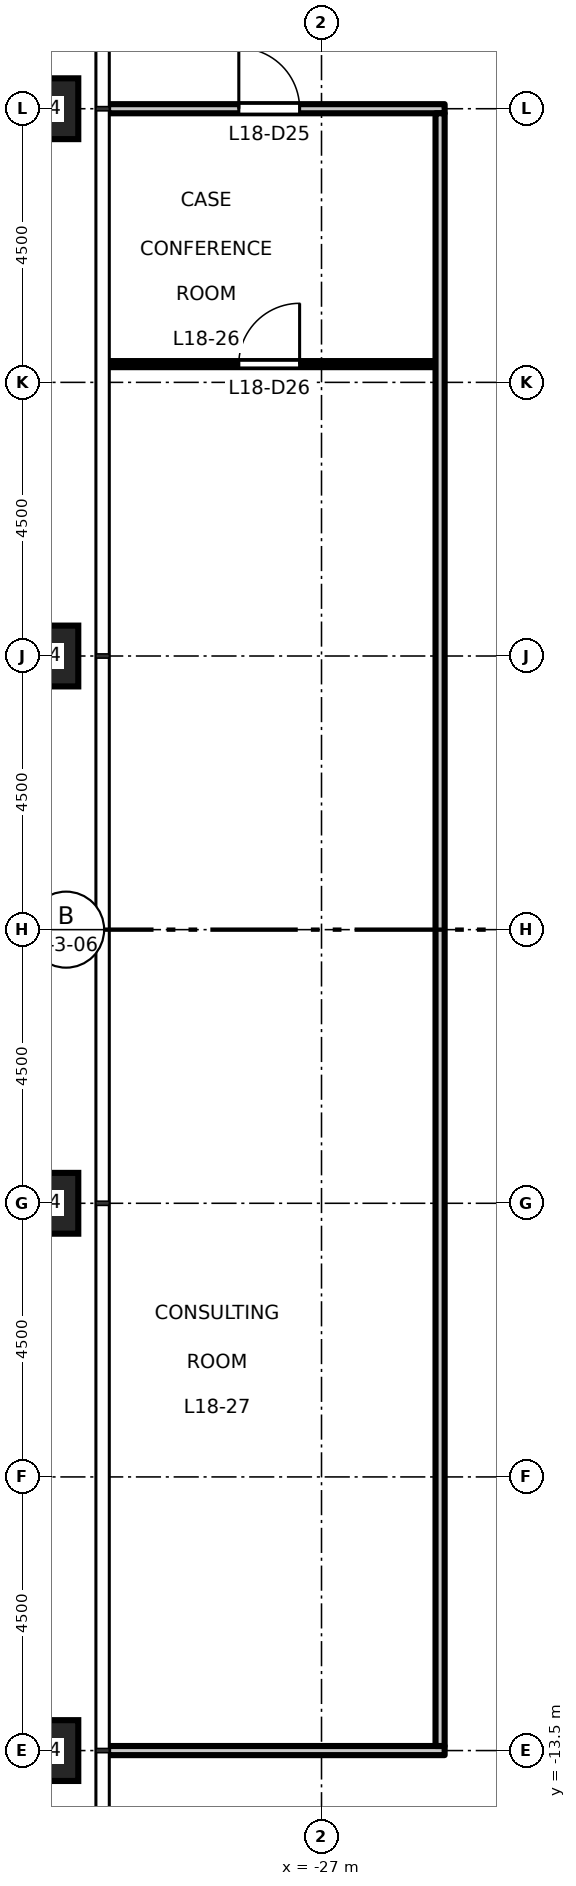
"""IFC4 building model, lengths in metres.
Left out: names, types, materials, properties, quantities, classifications, styles, units other than length and angle.
Written with IfcOpenShell. Run it as: python <this file> out.ifc"""

import sys

from ifc_helpers import new_model, si_unit, direction, frame, frame_2d, origin, origin_2d, place, context, subcontext, project, spatial, rectangle, hollow_rectangle, extrude, element, fill, save


model = new_model("IFC4")
c1 = context("Model", 3, precision=1e-05, world=origin(), true_north=direction((0.0, 1.0)))
c2 = subcontext(c1, "Body", "Model", "MODEL_VIEW")
j1 = project(units=[si_unit("LENGTHUNIT", "METRE"), si_unit("PLANEANGLEUNIT", "RADIAN")], contexts=[c1])
p1 = place(None, origin())
s1 = spatial("IfcSite", under=j1, at=p1, CompositionType="ELEMENT")
p2 = place(p1, origin())
s2 = spatial("IfcBuilding", under=s1, at=p2, CompositionType="ELEMENT")
p3 = place(p2, frame((0.0, 0.0, 85.2)))
s3 = spatial("IfcBuildingStorey", under=s2, at=p3, CompositionType="ELEMENT", Elevation=85.2)
for number, where, z_axis, x_axis in (
    (1, (-31.5, 13.5, 0.0), (0.0, 0.0, 1.0), (1.0, 0.0, 0.0)),
    (2, (-31.5, 4.5, 0.0), (0.0, 0.0, 1.0), (1.0, 0.0, 0.0)),
    (3, (-31.5, -4.5, 0.0), (0.0, 0.0, 1.0), (1.0, 0.0, 0.0)),
    (4, (-31.5, -13.5, 0.0), (0.0, 0.0, 1.0), (1.0, 0.0, 0.0)),
):
    element("IfcColumn", number, at=place(p3, frame(where, z_axis=z_axis, x_axis=x_axis)), inside=s3, PredefinedType="COLUMN", context=c2, shape_type="SweptSolid", body=[
        extrude(hollow_rectangle(XDim=1.0, YDim=1.0, WallThickness=0.06, at=origin_2d()), origin(), (0.0, 0.0, 1.0), 4.5),
    ])
p4 = place(p3, frame((-30.51, -13.5, 0.0), z_axis=(0.0, 0.0, 1.0), x_axis=(1.0, 0.0, 0.0)))
e5 = element("IfcWall", 5, at=p4, inside=s3, PredefinedType="PARTITIONING", context=c2, shape_type="SweptSolid", body=[
    extrude(rectangle(XDim=5.535, YDim=0.15, at=frame_2d((2.768, 0.0))), origin(), (0.0, 0.0, 1.0), 3.35),
])
p5 = place(p3, frame((-30.51, 9.3, 0.0), z_axis=(0.0, 0.0, 1.0), x_axis=(1.0, 0.0, 0.0)))
e6 = element("IfcWall", 6, at=p5, inside=s3, PredefinedType="PARTITIONING", context=c2, shape_type="SweptSolid", body=[
    extrude(rectangle(XDim=5.385, YDim=0.1, at=frame_2d((2.692, 0.0))), origin(), (0.0, 0.0, 1.0), 4.35),
])
p6 = place(p5, frame((2.15, 0.0, 0.0)))
e7 = element("IfcOpeningElement", 7, at=p6, cuts=e6, PredefinedType="OPENING", context=c2, shape_type="SweptSolid", body=[
    extrude(rectangle(XDim=1.0, YDim=2.1, at=frame_2d((0.5, 1.05))), frame((0.0, 0.06, 0.0), z_axis=(0.0, -1.0, 0.0), x_axis=(1.0, 0.0, 0.0)), (0.0, 0.0, 1.0), 0.12),
])
p7 = place(p3, frame((-30.51, 13.5, 0.0), z_axis=(0.0, 0.0, 1.0), x_axis=(1.0, 0.0, 0.0)))
e8 = element("IfcWall", 8, at=p7, inside=s3, PredefinedType="PARTITIONING", context=c2, shape_type="SweptSolid", body=[
    extrude(rectangle(XDim=5.535, YDim=0.15, at=frame_2d((2.768, 0.0))), origin(), (0.0, 0.0, 1.0), 3.35),
])
p8 = place(p7, frame((2.15, 0.0, 0.0)))
e9 = element("IfcOpeningElement", 9, at=p8, cuts=e8, PredefinedType="OPENING", context=c2, shape_type="SweptSolid", body=[
    extrude(rectangle(XDim=1.0, YDim=2.1, at=frame_2d((0.5, 1.05))), frame((0.0, 0.085, 0.0), z_axis=(0.0, -1.0, 0.0), x_axis=(1.0, 0.0, 0.0)), (0.0, 0.0, 1.0), 0.17),
])
p9 = place(p3, frame((-25.05, -13.425, 0.0), z_axis=(0.0, 0.0, 1.0), x_axis=(0.0, 1.0, 0.0)))
e10 = element("IfcWall", 10, at=p9, inside=s3, PredefinedType="PARTITIONING", context=c2, shape_type="SweptSolid", body=[
    extrude(rectangle(XDim=26.85, YDim=0.15, at=frame_2d((13.425, 0.0))), origin(), (0.0, 0.0, 1.0), 4.35),
])
p10 = place(p8, origin())
e11 = element("IfcDoor", 11, at=p10, inside=s3, OperationType="SINGLE_SWING_LEFT", PredefinedType="DOOR", context=c2, shape_type="SweptSolid", body=[
    extrude(rectangle(XDim=1.0, YDim=2.1, at=frame_2d((0.5, 1.05))), frame((0.0, 0.025, 0.0), z_axis=(0.0, -1.0, 0.0), x_axis=(1.0, 0.0, 0.0)), (0.0, 0.0, 1.0), 0.05),
])
fill(e9, e11)
p11 = place(p6, origin())
e12 = element("IfcDoor", 12, at=p11, inside=s3, OperationType="SINGLE_SWING_RIGHT", PredefinedType="DOOR", context=c2, shape_type="SweptSolid", body=[
    extrude(rectangle(XDim=1.0, YDim=2.1, at=frame_2d((0.5, 1.05))), frame((0.0, 0.025, 0.0), z_axis=(0.0, -1.0, 0.0), x_axis=(1.0, 0.0, 0.0)), (0.0, 0.0, 1.0), 0.05),
])
fill(e7, e12)
save(model, sys.argv[1])
